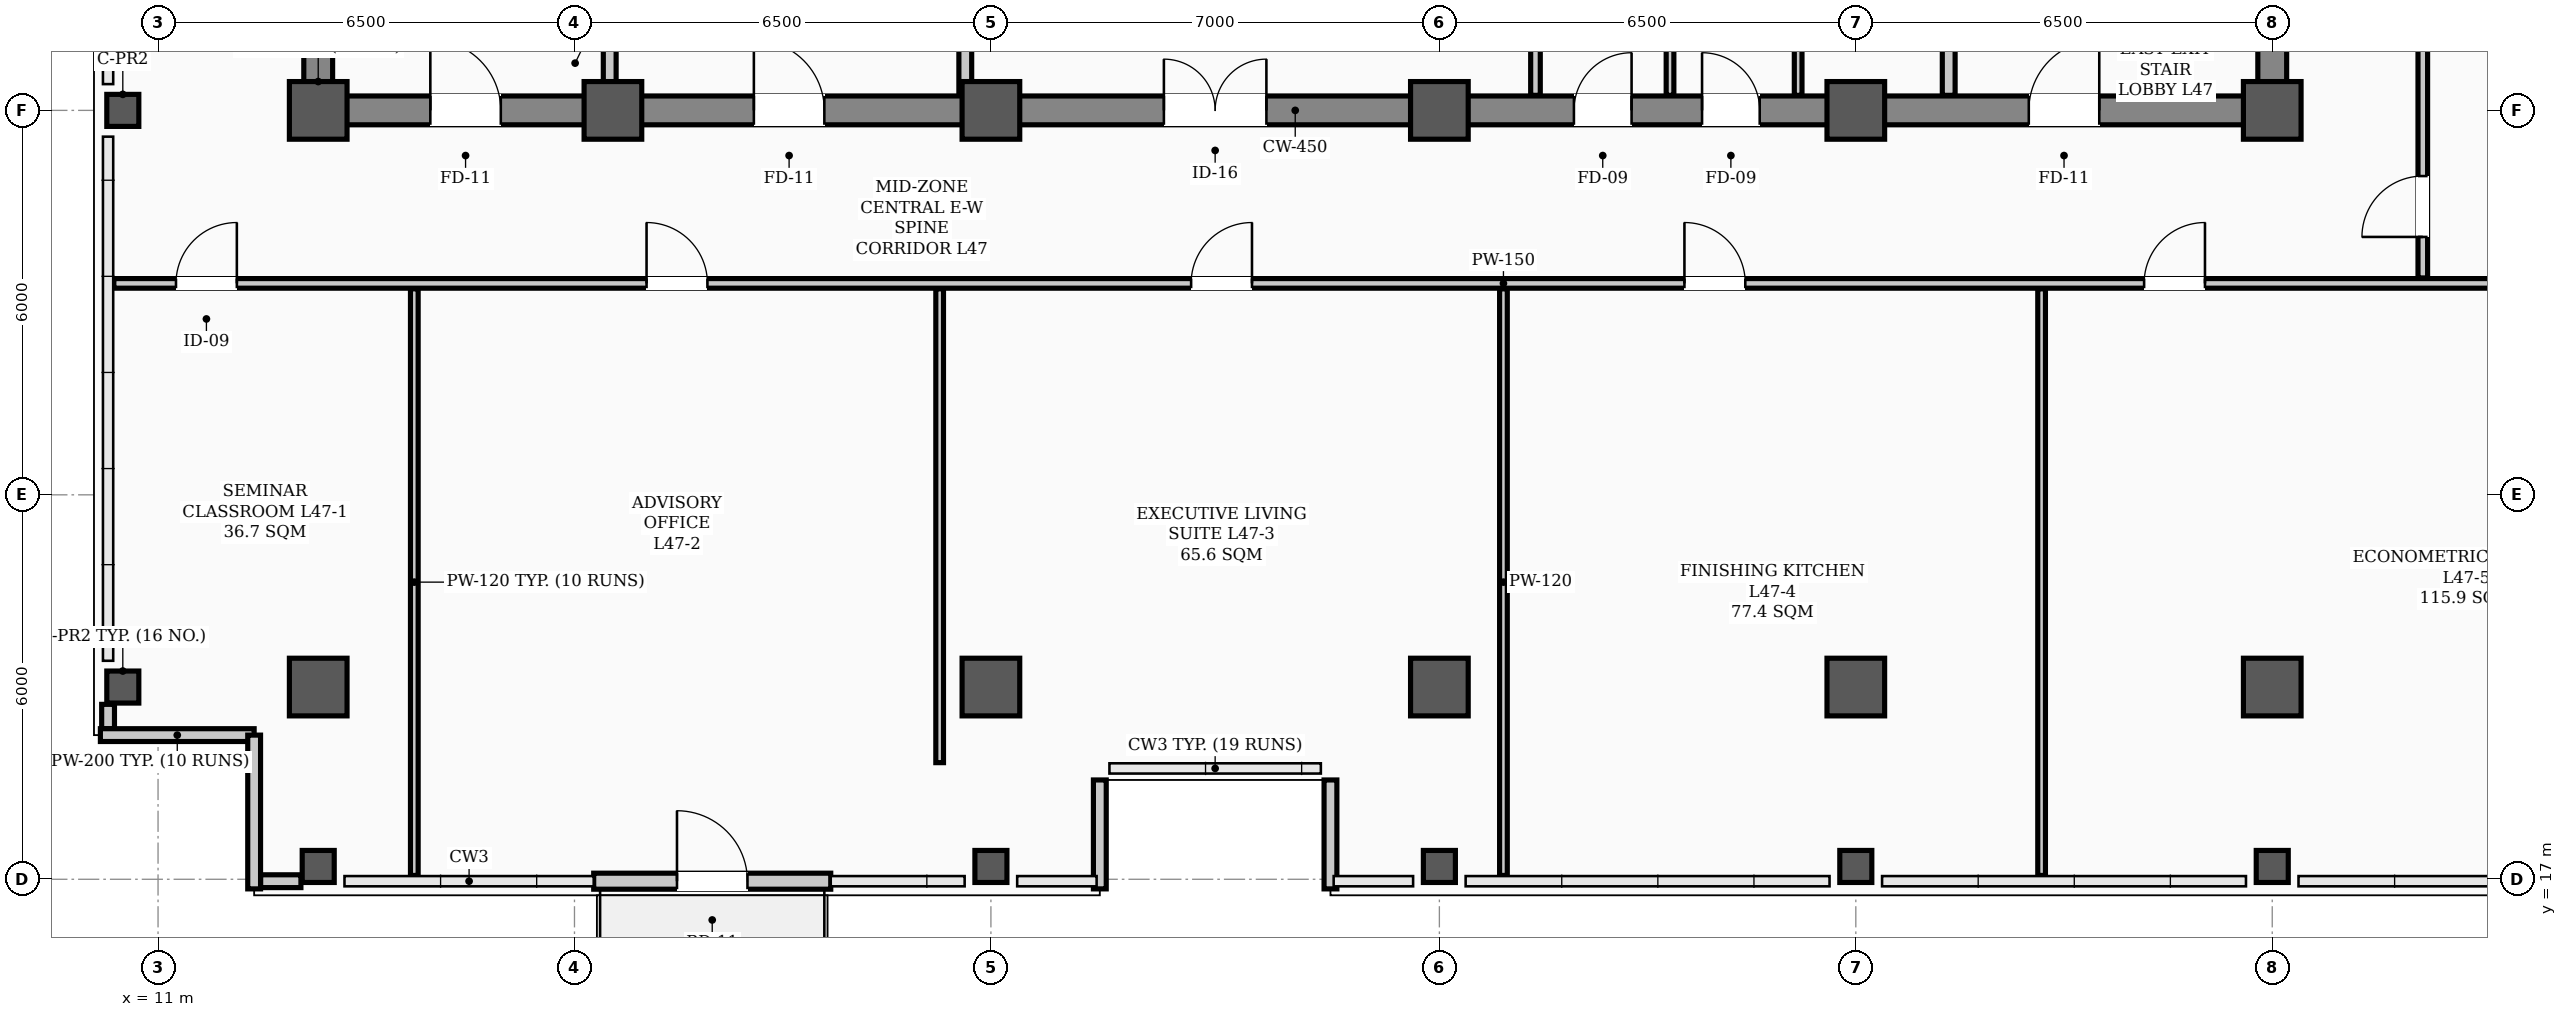
"""IFC4 building model, lengths in metres.
Left out: names, types, materials, properties, quantities, classifications, styles, units other than length and angle.
Written with IfcOpenShell. Run it as: python <this file> out.ifc"""

import sys

from ifc_helpers import new_model, si_unit, direction, frame, frame_2d, origin, origin_2d, place, context, subcontext, project, spatial, rectangle, hollow_rectangle, extrude, element, fill, save


model = new_model("IFC4")
c1 = context("Model", 3, precision=1e-05, world=origin(), true_north=direction((0.0, 1.0)))
c2 = subcontext(c1, "Body", "Model", "MODEL_VIEW")
j1 = project(units=[si_unit("LENGTHUNIT", "METRE"), si_unit("PLANEANGLEUNIT", "RADIAN")], contexts=[c1])
p1 = place(None, origin())
s1 = spatial("IfcSite", under=j1, at=p1, CompositionType="ELEMENT")
p2 = place(p1, origin())
s2 = spatial("IfcBuilding", under=s1, at=p2, CompositionType="ELEMENT")
p3 = place(p2, frame((0.0, 0.0, 189.0)))
s3 = spatial("IfcBuildingStorey", under=s2, at=p3, CompositionType="ELEMENT", Elevation=189.0)
for number, where, z_axis, x_axis in (
    (1, (13.5, 29.0, 0.0), (0.0, 0.0, 1.0), (1.0, 0.0, 0.0)),
    (2, (18.1, 29.0, 0.0), (0.0, 0.0, 1.0), (1.0, 0.0, 0.0)),
    (3, (24.0, 29.0, 0.0), (0.0, 0.0, 1.0), (1.0, 0.0, 0.0)),
    (4, (31.0, 29.0, 0.0), (0.0, 0.0, 1.0), (1.0, 0.0, 0.0)),
    (5, (37.5, 29.0, 0.0), (0.0, 0.0, 1.0), (1.0, 0.0, 0.0)),
    (6, (44.0, 29.0, 0.0), (0.0, 0.0, 1.0), (1.0, 0.0, 0.0)),
    (7, (13.5, 20.0, 0.0), (0.0, 0.0, 1.0), (1.0, 0.0, 0.0)),
    (8, (24.0, 20.0, 0.0), (0.0, 0.0, 1.0), (1.0, 0.0, 0.0)),
    (9, (31.0, 20.0, 0.0), (0.0, 0.0, 1.0), (1.0, 0.0, 0.0)),
    (10, (37.5, 20.0, 0.0), (0.0, 0.0, 1.0), (1.0, 0.0, 0.0)),
    (11, (44.0, 20.0, 0.0), (0.0, 0.0, 1.0), (1.0, 0.0, 0.0)),
):
    element("IfcColumn", number, at=place(p3, frame(where, z_axis=z_axis, x_axis=x_axis)), inside=s3, PredefinedType="COLUMN", context=c2, shape_type="SweptSolid", body=[
        extrude(hollow_rectangle(XDim=0.9, YDim=0.9, WallThickness=0.035, InnerFilletRadius=0.017, OuterFilletRadius=0.052, at=origin_2d()), origin(), (0.0, 0.0, 1.0), 3.9),
    ])
for number, where, z_axis, x_axis in (
    (12, (10.45, 20.0, 0.0), (0.0, 0.0, 1.0), (1.0, 0.0, 0.0)),
    (13, (10.45, 29.0, 0.0), (0.0, 0.0, 1.0), (1.0, 0.0, 0.0)),
    (14, (13.5, 17.2, 0.0), (0.0, 0.0, 1.0), (1.0, 0.0, 0.0)),
    (15, (24.0, 17.2, 0.0), (0.0, 0.0, 1.0), (1.0, 0.0, 0.0)),
    (16, (31.0, 17.2, 0.0), (0.0, 0.0, 1.0), (1.0, 0.0, 0.0)),
    (17, (37.5, 17.2, 0.0), (0.0, 0.0, 1.0), (1.0, 0.0, 0.0)),
    (18, (44.0, 17.2, 0.0), (0.0, 0.0, 1.0), (1.0, 0.0, 0.0)),
):
    element("IfcColumn", number, at=place(p3, frame(where, z_axis=z_axis, x_axis=x_axis)), inside=s3, PredefinedType="COLUMN", context=c2, shape_type="SweptSolid", body=[
        extrude(hollow_rectangle(XDim=0.5, YDim=0.5, WallThickness=0.024, InnerFilletRadius=0.012, OuterFilletRadius=0.036, at=origin_2d()), origin(), (0.0, 0.0, 1.0), 3.9),
    ])
p4 = place(p3, frame((10.22, 19.35, 0.0), z_axis=(0.0, 0.0, 1.0), x_axis=(0.0, 1.0, 0.0)))
e19 = element("IfcWall", 19, at=p4, inside=s3, PredefinedType="PARAPET", context=c2, shape_type="SweptSolid", body=[
    extrude(rectangle(XDim=0.38, YDim=0.2, at=frame_2d((0.19, 0.0))), origin(), (0.0, 0.0, 1.0), 1.2),
])
p5 = place(p3, frame((12.6, 16.97, 0.0), z_axis=(0.0, 0.0, 1.0), x_axis=(1.0, 0.0, 0.0)))
e20 = element("IfcWall", 20, at=p5, inside=s3, PredefinedType="PARAPET", context=c2, shape_type="SweptSolid", body=[
    extrude(rectangle(XDim=0.63, YDim=0.2, at=frame_2d((0.315, 0.0))), origin(), (0.0, 0.0, 1.0), 1.2),
])
for number, where, z_axis, x_axis in (
    (21, (10.1, 19.25, 0.0), (0.0, 0.0, 1.0), (1.0, 0.0, 0.0)),
    (22, (12.5, 19.25, 0.0), (0.0, 0.0, 1.0), (0.0, -1.0, 0.0)),
):
    element("IfcWall", number, at=place(p3, frame(where, z_axis=z_axis, x_axis=x_axis)), inside=s3, PredefinedType="PARAPET", context=c2, shape_type="SweptSolid", body=[
        extrude(rectangle(XDim=2.4, YDim=0.2, at=frame_2d((1.2, 0.0))), origin(), (0.0, 0.0, 1.0), 1.2),
    ])
for number, where, z_axis, x_axis in (
    (23, (25.7, 16.85, 0.0), (0.0, 0.0, 1.0), (0.0, 1.0, 0.0)),
    (24, (29.3, 18.55, 0.0), (0.0, 0.0, 1.0), (0.0, -1.0, 0.0)),
):
    element("IfcWall", number, at=place(p3, frame(where, z_axis=z_axis, x_axis=x_axis)), inside=s3, PredefinedType="PARAPET", context=c2, shape_type="SweptSolid", body=[
        extrude(rectangle(XDim=1.7, YDim=0.2, at=frame_2d((0.85, 0.0))), origin(), (0.0, 0.0, 1.0), 1.2),
    ])
p6 = place(p3, frame((17.8, 16.97, 0.0), z_axis=(0.0, 0.0, 1.0), x_axis=(1.0, 0.0, 0.0)))
e25 = element("IfcWall", 25, at=p6, inside=s3, PredefinedType="STANDARD", context=c2, shape_type="SweptSolid", body=[
    extrude(rectangle(XDim=3.7, YDim=0.25, at=frame_2d((1.85, 0.0))), origin(), (0.0, 0.0, 1.0), 3.18),
])
p7 = place(p6, frame((1.3, 0.0, 0.0)))
e26 = element("IfcOpeningElement", 26, at=p7, cuts=e25, PredefinedType="OPENING", context=c2, shape_type="SweptSolid", body=[
    extrude(rectangle(XDim=1.1, YDim=2.2, at=frame_2d((0.55, 1.1))), frame((0.0, 0.135, 0.0), z_axis=(0.0, -1.0, 0.0), x_axis=(1.0, 0.0, 0.0)), (0.0, 0.0, 1.0), 0.27),
])
p8 = place(p3, frame((13.5, 29.0, 0.0), z_axis=(0.0, 0.0, 1.0), x_axis=(1.0, 0.0, 0.0)))
e27 = element("IfcWall", 27, at=p8, inside=s3, PredefinedType="SHEAR", context=c2, shape_type="SweptSolid", body=[
    extrude(rectangle(XDim=30.5, YDim=0.45, at=frame_2d((15.25, 0.0))), origin(), (0.0, 0.0, 1.0), 3.72),
])
p9 = place(p8, frame((1.75, 0.0, 0.0)))
e28 = element("IfcOpeningElement", 28, at=p9, cuts=e27, PredefinedType="OPENING", context=c2, shape_type="SweptSolid", body=[
    extrude(rectangle(XDim=1.1, YDim=2.08, at=frame_2d((0.55, 1.04))), frame((0.0, 0.235, 0.0), z_axis=(0.0, -1.0, 0.0), x_axis=(1.0, 0.0, 0.0)), (0.0, 0.0, 1.0), 0.47),
])
p10 = place(p8, frame((26.7, 0.0, 0.0)))
e29 = element("IfcOpeningElement", 29, at=p10, cuts=e27, PredefinedType="OPENING", context=c2, shape_type="SweptSolid", body=[
    extrude(rectangle(XDim=1.1, YDim=2.08, at=frame_2d((0.55, 1.04))), frame((0.0, 0.235, 0.0), z_axis=(0.0, -1.0, 0.0), x_axis=(1.0, 0.0, 0.0)), (0.0, 0.0, 1.0), 0.47),
])
p11 = place(p8, frame((6.8, 0.0, 0.0)))
e30 = element("IfcOpeningElement", 30, at=p11, cuts=e27, PredefinedType="OPENING", context=c2, shape_type="SweptSolid", body=[
    extrude(rectangle(XDim=1.1, YDim=2.08, at=frame_2d((0.55, 1.04))), frame((0.0, 0.235, 0.0), z_axis=(0.0, -1.0, 0.0), x_axis=(1.0, 0.0, 0.0)), (0.0, 0.0, 1.0), 0.47),
])
p12 = place(p8, frame((13.2, 0.0, 0.0)))
e31 = element("IfcOpeningElement", 31, at=p12, cuts=e27, PredefinedType="OPENING", context=c2, shape_type="SweptSolid", body=[
    extrude(rectangle(XDim=1.6, YDim=2.08, at=frame_2d((0.8, 1.04))), frame((0.0, 0.235, 0.0), z_axis=(0.0, -1.0, 0.0), x_axis=(1.0, 0.0, 0.0)), (0.0, 0.0, 1.0), 0.47),
])
p13 = place(p8, frame((19.6, 0.0, 0.0)))
e32 = element("IfcOpeningElement", 32, at=p13, cuts=e27, PredefinedType="OPENING", context=c2, shape_type="SweptSolid", body=[
    extrude(rectangle(XDim=0.9, YDim=2.08, at=frame_2d((0.45, 1.04))), frame((0.0, 0.235, 0.0), z_axis=(0.0, -1.0, 0.0), x_axis=(1.0, 0.0, 0.0)), (0.0, 0.0, 1.0), 0.47),
])
p14 = place(p8, frame((21.6, 0.0, 0.0)))
e33 = element("IfcOpeningElement", 33, at=p14, cuts=e27, PredefinedType="OPENING", context=c2, shape_type="SweptSolid", body=[
    extrude(rectangle(XDim=0.9, YDim=2.08, at=frame_2d((0.45, 1.04))), frame((0.0, 0.235, 0.0), z_axis=(0.0, -1.0, 0.0), x_axis=(1.0, 0.0, 0.0)), (0.0, 0.0, 1.0), 0.47),
])
for number, where, z_axis, x_axis in (
    (34, (13.5, 29.35, 0.0), (0.0, 0.0, 1.0), (0.0, 1.0, 0.0)),
    (35, (44.0, 29.35, 0.0), (0.0, 0.0, 1.0), (0.0, 1.0, 0.0)),
):
    element("IfcWall", number, at=place(p3, frame(where, z_axis=z_axis, x_axis=x_axis)), inside=s3, PredefinedType="SHEAR", context=c2, shape_type="SweptSolid", body=[
        extrude(rectangle(XDim=8.6, YDim=0.45, at=frame_2d((4.3, 0.0))), origin(), (0.0, 0.0, 1.0), 3.72),
    ])
p15 = place(p3, frame((10.31, 26.3, 0.0), z_axis=(0.0, 0.0, 1.0), x_axis=(1.0, 0.0, 0.0)))
e36 = element("IfcWall", 36, at=p15, inside=s3, PredefinedType="PARTITIONING", context=c2, shape_type="SweptSolid", body=[
    extrude(rectangle(XDim=43.38, YDim=0.15, at=frame_2d((21.69, 0.0))), origin(), (0.0, 0.0, 1.0), 3.2),
])
p16 = place(p15, frame((0.97, 0.0, 0.0)))
e37 = element("IfcOpeningElement", 37, at=p16, cuts=e36, PredefinedType="OPENING", context=c2, shape_type="SweptSolid", body=[
    extrude(rectangle(XDim=0.95, YDim=2.08, at=frame_2d((0.475, 1.04))), frame((0.0, 0.085, 0.0), z_axis=(0.0, -1.0, 0.0), x_axis=(1.0, 0.0, 0.0)), (0.0, 0.0, 1.0), 0.17),
])
p17 = place(p15, frame((8.315, 0.0, 0.0)))
e38 = element("IfcOpeningElement", 38, at=p17, cuts=e36, PredefinedType="OPENING", context=c2, shape_type="SweptSolid", body=[
    extrude(rectangle(XDim=0.95, YDim=2.08, at=frame_2d((0.475, 1.04))), frame((0.0, 0.085, 0.0), z_axis=(0.0, -1.0, 0.0), x_axis=(1.0, 0.0, 0.0)), (0.0, 0.0, 1.0), 0.17),
])
p18 = place(p15, frame((16.815, 0.0, 0.0)))
e39 = element("IfcOpeningElement", 39, at=p18, cuts=e36, PredefinedType="OPENING", context=c2, shape_type="SweptSolid", body=[
    extrude(rectangle(XDim=0.95, YDim=2.08, at=frame_2d((0.475, 1.04))), frame((0.0, 0.085, 0.0), z_axis=(0.0, -1.0, 0.0), x_axis=(1.0, 0.0, 0.0)), (0.0, 0.0, 1.0), 0.17),
])
p19 = place(p15, frame((24.515, 0.0, 0.0)))
e40 = element("IfcOpeningElement", 40, at=p19, cuts=e36, PredefinedType="OPENING", context=c2, shape_type="SweptSolid", body=[
    extrude(rectangle(XDim=0.95, YDim=2.08, at=frame_2d((0.475, 1.04))), frame((0.0, 0.085, 0.0), z_axis=(0.0, -1.0, 0.0), x_axis=(1.0, 0.0, 0.0)), (0.0, 0.0, 1.0), 0.17),
])
p20 = place(p15, frame((31.69, 0.0, 0.0)))
e41 = element("IfcOpeningElement", 41, at=p20, cuts=e36, PredefinedType="OPENING", context=c2, shape_type="SweptSolid", body=[
    extrude(rectangle(XDim=0.95, YDim=2.08, at=frame_2d((0.475, 1.04))), frame((0.0, 0.085, 0.0), z_axis=(0.0, -1.0, 0.0), x_axis=(1.0, 0.0, 0.0)), (0.0, 0.0, 1.0), 0.17),
])
for number, where, z_axis, x_axis in (
    (42, (18.05, 29.235, 0.0), (0.0, 0.0, 1.0), (0.0, 1.0, 0.0)),
    (43, (38.95, 29.235, 0.0), (0.0, 0.0, 1.0), (0.0, 1.0, 0.0)),
):
    element("IfcWall", number, at=place(p3, frame(where, z_axis=z_axis, x_axis=x_axis)), inside=s3, PredefinedType="STANDARD", context=c2, shape_type="SweptSolid", body=[
        extrude(rectangle(XDim=1.065, YDim=0.2, at=frame_2d((0.532, 0.0))), origin(), (0.0, 0.0, 1.0), 3.35),
    ])
p21 = place(p3, frame((23.6, 29.235, 0.0), z_axis=(0.0, 0.0, 1.0), x_axis=(0.0, 1.0, 0.0)))
e44 = element("IfcWall", 44, at=p21, inside=s3, PredefinedType="STANDARD", context=c2, shape_type="SweptSolid", body=[
    extrude(rectangle(XDim=5.465, YDim=0.2, at=frame_2d((2.732, 0.0))), origin(), (0.0, 0.0, 1.0), 3.2),
])
p22 = place(p3, frame((32.5, 29.235, 0.0), z_axis=(0.0, 0.0, 1.0), x_axis=(0.0, 1.0, 0.0)))
e45 = element("IfcWall", 45, at=p22, inside=s3, PredefinedType="PARTITIONING", context=c2, shape_type="SweptSolid", body=[
    extrude(rectangle(XDim=2.53, YDim=0.15, at=frame_2d((1.265, 0.0))), origin(), (0.0, 0.0, 1.0), 3.35),
])
for number, where, z_axis, x_axis in (
    (46, (36.6, 29.235, 0.0), (0.0, 0.0, 1.0), (0.0, 1.0, 0.0)),
    (47, (34.6, 29.235, 0.0), (0.0, 0.0, 1.0), (0.0, 1.0, 0.0)),
):
    element("IfcWall", number, at=place(p3, frame(where, z_axis=z_axis, x_axis=x_axis)), inside=s3, PredefinedType="PARTITIONING", context=c2, shape_type="SweptSolid", body=[
        extrude(rectangle(XDim=2.53, YDim=0.12, at=frame_2d((1.265, 0.0))), origin(), (0.0, 0.0, 1.0), 3.35),
    ])
p23 = place(p3, frame((46.35, 26.385, 0.0), z_axis=(0.0, 0.0, 1.0), x_axis=(0.0, 1.0, 0.0)))
e48 = element("IfcWall", 48, at=p23, inside=s3, PredefinedType="PARTITIONING", context=c2, shape_type="SweptSolid", body=[
    extrude(rectangle(XDim=13.58, YDim=0.15, at=frame_2d((6.79, 0.0))), origin(), (0.0, 0.0, 1.0), 3.1),
])
p24 = place(p23, frame((0.64, 0.0, 0.0)))
e49 = element("IfcOpeningElement", 49, at=p24, cuts=e48, PredefinedType="OPENING", context=c2, shape_type="SweptSolid", body=[
    extrude(rectangle(XDim=0.95, YDim=2.08, at=frame_2d((0.475, 1.04))), frame((0.0, 0.085, 0.0), z_axis=(0.0, -1.0, 0.0), x_axis=(1.0, 0.0, 0.0)), (0.0, 0.0, 1.0), 0.17),
])
p25 = place(p23, frame((9.665, 0.0, 0.0)))
e50 = element("IfcOpeningElement", 50, at=p25, cuts=e48, PredefinedType="OPENING", context=c2, shape_type="SweptSolid", body=[
    extrude(rectangle(XDim=0.95, YDim=2.08, at=frame_2d((0.475, 1.04))), frame((0.0, 0.085, 0.0), z_axis=(0.0, -1.0, 0.0), x_axis=(1.0, 0.0, 0.0)), (0.0, 0.0, 1.0), 0.17),
])
p26 = place(p3, frame((15.0, 17.06, 0.0), z_axis=(0.0, 0.0, 1.0), x_axis=(0.0, 1.0, 0.0)))
e51 = element("IfcWall", 51, at=p26, inside=s3, PredefinedType="PARTITIONING", context=c2, shape_type="SweptSolid", body=[
    extrude(rectangle(XDim=9.155, YDim=0.12, at=frame_2d((4.578, 0.0))), origin(), (0.0, 0.0, 1.0), 3.1),
])
p27 = place(p3, frame((23.2, 18.82, 0.0), z_axis=(0.0, 0.0, 1.0), x_axis=(0.0, 1.0, 0.0)))
e52 = element("IfcWall", 52, at=p27, inside=s3, PredefinedType="PARTITIONING", context=c2, shape_type="SweptSolid", body=[
    extrude(rectangle(XDim=7.395, YDim=0.12, at=frame_2d((3.698, 0.0))), origin(), (0.0, 0.0, 1.0), 3.1),
])
for number, where, z_axis, x_axis in (
    (53, (32.0, 17.06, 0.0), (0.0, 0.0, 1.0), (0.0, 1.0, 0.0)),
    (54, (40.4, 17.06, 0.0), (0.0, 0.0, 1.0), (0.0, 1.0, 0.0)),
):
    element("IfcWall", number, at=place(p3, frame(where, z_axis=z_axis, x_axis=x_axis)), inside=s3, PredefinedType="PARTITIONING", context=c2, shape_type="SweptSolid", body=[
        extrude(rectangle(XDim=9.155, YDim=0.12, at=frame_2d((4.578, 0.0))), origin(), (0.0, 0.0, 1.0), 3.1),
    ])
p28 = place(p7, origin())
e55 = element("IfcDoor", 55, at=p28, inside=s3, OperationType="SINGLE_SWING_LEFT", PredefinedType="DOOR", context=c2, shape_type="SweptSolid", body=[
    extrude(rectangle(XDim=1.1, YDim=2.2, at=frame_2d((0.55, 1.1))), frame((0.0, 0.025, 0.0), z_axis=(0.0, -1.0, 0.0), x_axis=(1.0, 0.0, 0.0)), (0.0, 0.0, 1.0), 0.05),
])
fill(e26, e55)
p29 = place(p9, origin())
e56 = element("IfcDoor", 56, at=p29, inside=s3, OperationType="SINGLE_SWING_LEFT", PredefinedType="DOOR", context=c2, shape_type="SweptSolid", body=[
    extrude(rectangle(XDim=1.1, YDim=2.08, at=frame_2d((0.55, 1.04))), frame((0.0, 0.025, 0.0), z_axis=(0.0, -1.0, 0.0), x_axis=(1.0, 0.0, 0.0)), (0.0, 0.0, 1.0), 0.05),
])
fill(e28, e56)
p30 = place(p10, origin())
e57 = element("IfcDoor", 57, at=p30, inside=s3, OperationType="SINGLE_SWING_RIGHT", PredefinedType="DOOR", context=c2, shape_type="SweptSolid", body=[
    extrude(rectangle(XDim=1.1, YDim=2.08, at=frame_2d((0.55, 1.04))), frame((0.0, 0.025, 0.0), z_axis=(0.0, -1.0, 0.0), x_axis=(1.0, 0.0, 0.0)), (0.0, 0.0, 1.0), 0.05),
])
fill(e29, e57)
p31 = place(p11, origin())
e58 = element("IfcDoor", 58, at=p31, inside=s3, OperationType="SINGLE_SWING_LEFT", PredefinedType="DOOR", context=c2, shape_type="SweptSolid", body=[
    extrude(rectangle(XDim=1.1, YDim=2.08, at=frame_2d((0.55, 1.04))), frame((0.0, 0.025, 0.0), z_axis=(0.0, -1.0, 0.0), x_axis=(1.0, 0.0, 0.0)), (0.0, 0.0, 1.0), 0.05),
])
fill(e30, e58)
p32 = place(p12, origin())
e59 = element("IfcDoor", 59, at=p32, inside=s3, OperationType="DOUBLE_DOOR_SINGLE_SWING", PredefinedType="DOOR", context=c2, shape_type="SweptSolid", body=[
    extrude(rectangle(XDim=1.6, YDim=2.08, at=frame_2d((0.8, 1.04))), frame((0.0, 0.025, 0.0), z_axis=(0.0, -1.0, 0.0), x_axis=(1.0, 0.0, 0.0)), (0.0, 0.0, 1.0), 0.05),
])
fill(e31, e59)
p33 = place(p13, origin())
e60 = element("IfcDoor", 60, at=p33, inside=s3, OperationType="SINGLE_SWING_RIGHT", PredefinedType="DOOR", context=c2, shape_type="SweptSolid", body=[
    extrude(rectangle(XDim=0.9, YDim=2.08, at=frame_2d((0.45, 1.04))), frame((0.0, 0.025, 0.0), z_axis=(0.0, -1.0, 0.0), x_axis=(1.0, 0.0, 0.0)), (0.0, 0.0, 1.0), 0.05),
])
fill(e32, e60)
p34 = place(p14, origin())
e61 = element("IfcDoor", 61, at=p34, inside=s3, OperationType="SINGLE_SWING_LEFT", PredefinedType="DOOR", context=c2, shape_type="SweptSolid", body=[
    extrude(rectangle(XDim=0.9, YDim=2.08, at=frame_2d((0.45, 1.04))), frame((0.0, 0.025, 0.0), z_axis=(0.0, -1.0, 0.0), x_axis=(1.0, 0.0, 0.0)), (0.0, 0.0, 1.0), 0.05),
])
fill(e33, e61)
p35 = place(p16, origin())
e62 = element("IfcDoor", 62, at=p35, inside=s3, OperationType="SINGLE_SWING_RIGHT", PredefinedType="DOOR", context=c2, shape_type="SweptSolid", body=[
    extrude(rectangle(XDim=0.95, YDim=2.08, at=frame_2d((0.475, 1.04))), frame((0.0, 0.025, 0.0), z_axis=(0.0, -1.0, 0.0), x_axis=(1.0, 0.0, 0.0)), (0.0, 0.0, 1.0), 0.05),
])
fill(e37, e62)
p36 = place(p17, origin())
e63 = element("IfcDoor", 63, at=p36, inside=s3, OperationType="SINGLE_SWING_LEFT", PredefinedType="DOOR", context=c2, shape_type="SweptSolid", body=[
    extrude(rectangle(XDim=0.95, YDim=2.08, at=frame_2d((0.475, 1.04))), frame((0.0, 0.025, 0.0), z_axis=(0.0, -1.0, 0.0), x_axis=(1.0, 0.0, 0.0)), (0.0, 0.0, 1.0), 0.05),
])
fill(e38, e63)
p37 = place(p18, origin())
e64 = element("IfcDoor", 64, at=p37, inside=s3, OperationType="SINGLE_SWING_RIGHT", PredefinedType="DOOR", context=c2, shape_type="SweptSolid", body=[
    extrude(rectangle(XDim=0.95, YDim=2.08, at=frame_2d((0.475, 1.04))), frame((0.0, 0.025, 0.0), z_axis=(0.0, -1.0, 0.0), x_axis=(1.0, 0.0, 0.0)), (0.0, 0.0, 1.0), 0.05),
])
fill(e39, e64)
p38 = place(p19, origin())
e65 = element("IfcDoor", 65, at=p38, inside=s3, OperationType="SINGLE_SWING_LEFT", PredefinedType="DOOR", context=c2, shape_type="SweptSolid", body=[
    extrude(rectangle(XDim=0.95, YDim=2.08, at=frame_2d((0.475, 1.04))), frame((0.0, 0.025, 0.0), z_axis=(0.0, -1.0, 0.0), x_axis=(1.0, 0.0, 0.0)), (0.0, 0.0, 1.0), 0.05),
])
fill(e40, e65)
p39 = place(p20, origin())
e66 = element("IfcDoor", 66, at=p39, inside=s3, OperationType="SINGLE_SWING_RIGHT", PredefinedType="DOOR", context=c2, shape_type="SweptSolid", body=[
    extrude(rectangle(XDim=0.95, YDim=2.08, at=frame_2d((0.475, 1.04))), frame((0.0, 0.025, 0.0), z_axis=(0.0, -1.0, 0.0), x_axis=(1.0, 0.0, 0.0)), (0.0, 0.0, 1.0), 0.05),
])
fill(e41, e66)
p40 = place(p24, origin())
e67 = element("IfcDoor", 67, at=p40, inside=s3, OperationType="SINGLE_SWING_LEFT", PredefinedType="DOOR", context=c2, shape_type="SweptSolid", body=[
    extrude(rectangle(XDim=0.95, YDim=2.08, at=frame_2d((0.475, 1.04))), frame((0.0, 0.025, 0.0), z_axis=(0.0, -1.0, 0.0), x_axis=(1.0, 0.0, 0.0)), (0.0, 0.0, 1.0), 0.05),
])
fill(e49, e67)
save(model, sys.argv[1])
